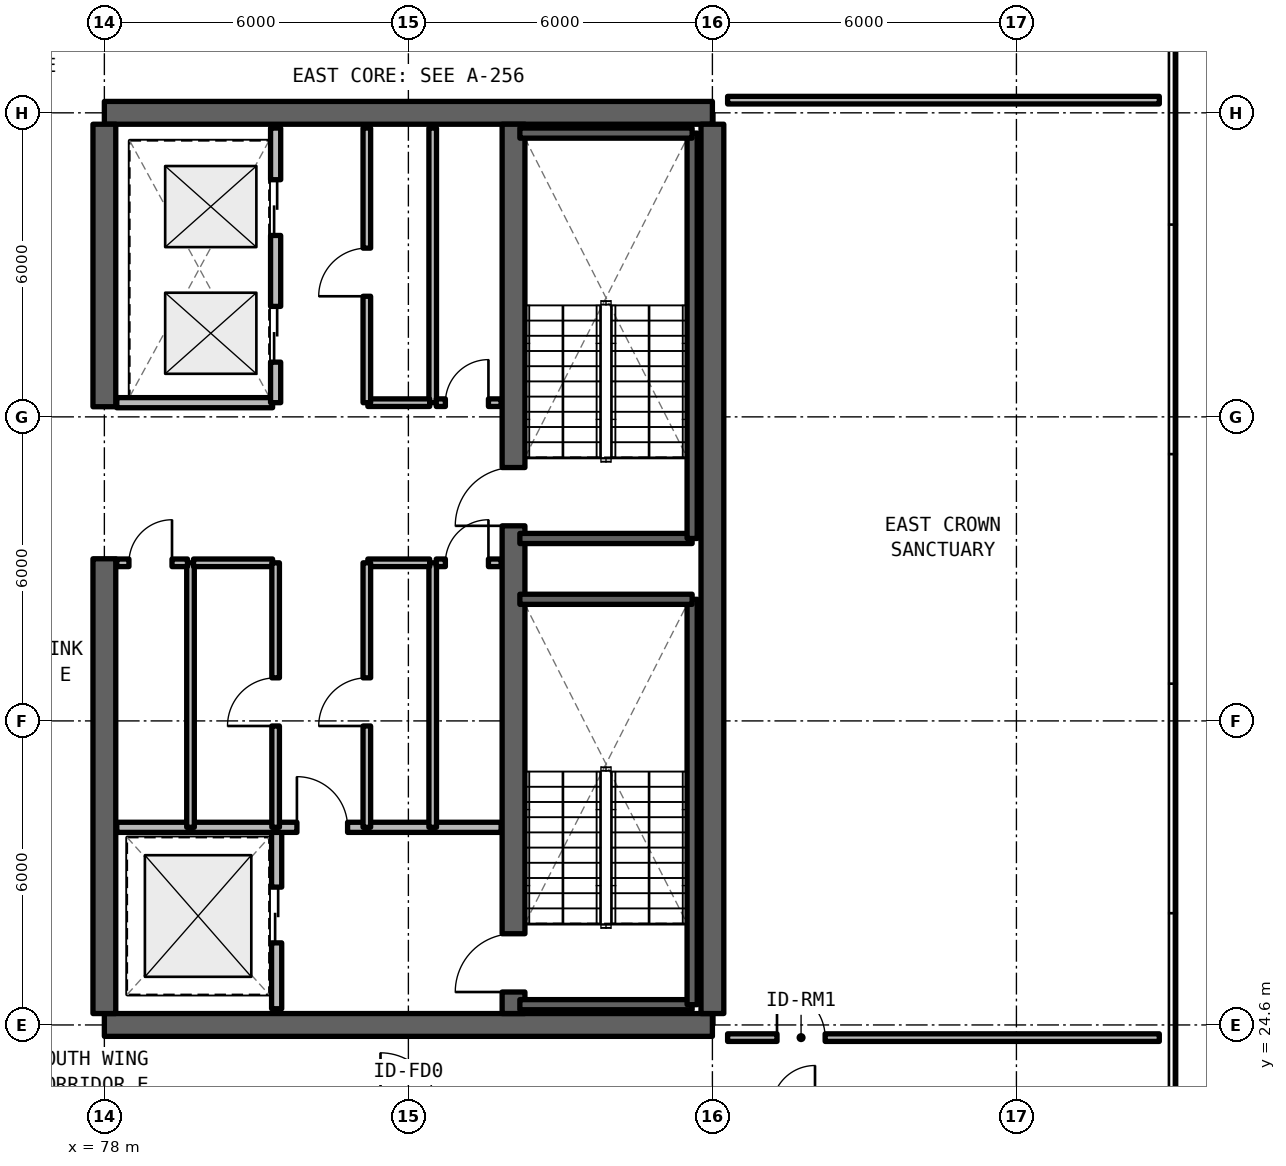
"""IFC4 building model, lengths in metres.
Left out: names, types, materials, properties, quantities, classifications, styles, units other than length and angle.
Written with IfcOpenShell. Run it as: python <this file> out.ifc"""

import sys

from ifc_helpers import new_model, si_unit, direction, frame, frame_2d, origin, place, context, subcontext, project, spatial, rectangle, extrude, element, fill, save


model = new_model("IFC4")
c1 = context("Model", 3, precision=1e-05, world=origin(), true_north=direction((0.0, 1.0)))
c2 = subcontext(c1, "Body", "Model", "MODEL_VIEW")
j1 = project(units=[si_unit("LENGTHUNIT", "METRE"), si_unit("PLANEANGLEUNIT", "RADIAN")], contexts=[c1])
p1 = place(None, origin())
s1 = spatial("IfcSite", under=j1, at=p1, CompositionType="ELEMENT")
p2 = place(p1, origin())
s2 = spatial("IfcBuilding", under=s1, at=p2, CompositionType="ELEMENT")
p3 = place(p2, frame((0.0, 0.0, 257.07)))
s3 = spatial("IfcBuildingStorey", under=s2, at=p3, CompositionType="ELEMENT", Elevation=257.07)
for number, where, z_axis, x_axis in (
    (1, (78.0, 24.6, 0.0), (0.0, 0.0, 1.0), (1.0, 0.0, 0.0)),
    (2, (90.0, 42.6, 0.0), (0.0, 0.0, 1.0), (-1.0, 0.0, 0.0)),
):
    element("IfcWall", number, at=place(p3, frame(where, z_axis=z_axis, x_axis=x_axis)), inside=s3, PredefinedType="SHEAR", context=c2, shape_type="SweptSolid", body=[
        extrude(rectangle(XDim=12.0, YDim=0.45, at=frame_2d((6.0, 0.0))), origin(), (0.0, 0.0, 1.0), 3.63),
    ])
p4 = place(p3, frame((90.0, 24.825, 0.0), z_axis=(0.0, 0.0, 1.0), x_axis=(0.0, 1.0, 0.0)))
e3 = element("IfcWall", 3, at=p4, inside=s3, PredefinedType="SHEAR", context=c2, shape_type="SweptSolid", body=[
    extrude(rectangle(XDim=17.55, YDim=0.45, at=frame_2d((8.775, 0.0))), origin(), (0.0, 0.0, 1.0), 3.63),
])
p5 = place(p3, frame((78.0, 24.825, 0.0), z_axis=(0.0, 0.0, 1.0), x_axis=(0.0, 1.0, 0.0)))
e4 = element("IfcWall", 4, at=p5, inside=s3, PredefinedType="SHEAR", context=c2, shape_type="SweptSolid", body=[
    extrude(rectangle(XDim=8.975, YDim=0.45, at=frame_2d((4.488, 0.0))), origin(), (0.0, 0.0, 1.0), 3.63),
])
p6 = place(p3, frame((78.0, 36.8, 0.0), z_axis=(0.0, 0.0, 1.0), x_axis=(0.0, 1.0, 0.0)))
e5 = element("IfcWall", 5, at=p6, inside=s3, PredefinedType="SHEAR", context=c2, shape_type="SweptSolid", body=[
    extrude(rectangle(XDim=5.575, YDim=0.45, at=frame_2d((2.788, 0.0))), origin(), (0.0, 0.0, 1.0), 3.63),
])
p7 = place(p3, frame((86.075, 24.825, 0.0), z_axis=(0.0, 0.0, 1.0), x_axis=(0.0, 1.0, 0.0)))
e6 = element("IfcWall", 6, at=p7, inside=s3, PredefinedType="SHEAR", context=c2, shape_type="SweptSolid", body=[
    extrude(rectangle(XDim=17.55, YDim=0.45, at=frame_2d((8.775, 0.0))), origin(), (0.0, 0.0, 1.0), 3.63),
])
p8 = place(p7, frame((0.425, 0.0, 0.0)))
e7 = element("IfcOpeningElement", 7, at=p8, cuts=e6, PredefinedType="OPENING", context=c2, shape_type="SweptSolid", body=[
    extrude(rectangle(XDim=1.15, YDim=2.15, at=frame_2d((0.575, 1.075))), frame((0.0, 0.235, 0.0), z_axis=(0.0, -1.0, 0.0), x_axis=(1.0, 0.0, 0.0)), (0.0, 0.0, 1.0), 0.47),
])
p9 = place(p7, frame((9.625, 0.0, 0.0)))
e8 = element("IfcOpeningElement", 8, at=p9, cuts=e6, PredefinedType="OPENING", context=c2, shape_type="SweptSolid", body=[
    extrude(rectangle(XDim=1.15, YDim=2.15, at=frame_2d((0.575, 1.075))), frame((0.0, 0.235, 0.0), z_axis=(0.0, -1.0, 0.0), x_axis=(1.0, 0.0, 0.0)), (0.0, 0.0, 1.0), 0.47),
])
p10 = place(p3, frame((81.4, 24.92, 0.0), z_axis=(0.0, 0.0, 1.0), x_axis=(0.0, 1.0, 0.0)))
e9 = element("IfcWall", 9, at=p10, inside=s3, PredefinedType="SOLIDWALL", context=c2, shape_type="SweptSolid", body=[
    extrude(rectangle(XDim=3.58, YDim=0.2, at=frame_2d((1.79, 0.0))), origin(), (0.0, 0.0, 1.0), 2.63),
])
p11 = place(p10, frame((1.3, 0.0, 0.0)))
e10 = element("IfcOpeningElement", 10, at=p11, cuts=e9, PredefinedType="OPENING", context=c2, shape_type="SweptSolid", body=[
    extrude(rectangle(XDim=1.1, YDim=2.2, at=frame_2d((0.55, 1.1))), frame((0.0, 0.11, 0.0), z_axis=(0.0, -1.0, 0.0), x_axis=(1.0, 0.0, 0.0)), (0.0, 0.0, 1.0), 0.22),
])
p12 = place(p3, frame((78.245, 28.5, 0.0), z_axis=(0.0, 0.0, 1.0), x_axis=(1.0, 0.0, 0.0)))
e11 = element("IfcWall", 11, at=p12, inside=s3, PredefinedType="SOLIDWALL", context=c2, shape_type="SweptSolid", body=[
    extrude(rectangle(XDim=7.585, YDim=0.2, at=frame_2d((3.792, 0.0))), origin(), (0.0, 0.0, 1.0), 2.63),
])
p13 = place(p12, frame((3.555, 0.0, 0.0)))
e12 = element("IfcOpeningElement", 12, at=p13, cuts=e11, PredefinedType="OPENING", context=c2, shape_type="SweptSolid", body=[
    extrude(rectangle(XDim=1.0, YDim=2.15, at=frame_2d((0.5, 1.075))), frame((0.0, 0.11, 0.0), z_axis=(0.0, -1.0, 0.0), x_axis=(1.0, 0.0, 0.0)), (0.0, 0.0, 1.0), 0.22),
])
p14 = place(p3, frame((84.48, 28.5, 0.0), z_axis=(0.0, 0.0, 1.0), x_axis=(0.0, 1.0, 0.0)))
e13 = element("IfcWall", 13, at=p14, inside=s3, PredefinedType="SOLIDWALL", context=c2, shape_type="SweptSolid", body=[
    extrude(rectangle(XDim=5.22, YDim=0.15, at=frame_2d((2.61, 0.0))), origin(), (0.0, 0.0, 1.0), 2.63),
])
p15 = place(p3, frame((84.55, 33.72, 0.0), z_axis=(0.0, 0.0, 1.0), x_axis=(1.0, 0.0, 0.0)))
e14 = element("IfcWall", 14, at=p15, inside=s3, PredefinedType="SOLIDWALL", context=c2, shape_type="SweptSolid", body=[
    extrude(rectangle(XDim=1.28, YDim=0.15, at=frame_2d((0.64, 0.0))), origin(), (0.0, 0.0, 1.0), 2.63),
])
p16 = place(p15, frame((0.18, 0.0, 0.0)))
e15 = element("IfcOpeningElement", 15, at=p16, cuts=e14, PredefinedType="OPENING", context=c2, shape_type="SweptSolid", body=[
    extrude(rectangle(XDim=0.85, YDim=2.1, at=frame_2d((0.425, 1.05))), frame((0.0, 0.085, 0.0), z_axis=(0.0, -1.0, 0.0), x_axis=(1.0, 0.0, 0.0)), (0.0, 0.0, 1.0), 0.17),
])
p17 = place(p3, frame((83.2, 33.72, 0.0), z_axis=(0.0, 0.0, 1.0), x_axis=(1.0, 0.0, 0.0)))
e16 = element("IfcWall", 16, at=p17, inside=s3, PredefinedType="SOLIDWALL", context=c2, shape_type="SweptSolid", body=[
    extrude(rectangle(XDim=1.22, YDim=0.15, at=frame_2d((0.61, 0.0))), origin(), (0.0, 0.0, 1.0), 2.63),
])
p18 = place(p3, frame((83.18, 28.5, 0.0), z_axis=(0.0, 0.0, 1.0), x_axis=(0.0, 1.0, 0.0)))
e17 = element("IfcWall", 17, at=p18, inside=s3, PredefinedType="SOLIDWALL", context=c2, shape_type="SweptSolid", body=[
    extrude(rectangle(XDim=5.22, YDim=0.15, at=frame_2d((2.61, 0.0))), origin(), (0.0, 0.0, 1.0), 2.63),
])
p19 = place(p18, frame((2.0, 0.0, 0.0)))
e18 = element("IfcOpeningElement", 18, at=p19, cuts=e17, PredefinedType="OPENING", context=c2, shape_type="SweptSolid", body=[
    extrude(rectangle(XDim=0.95, YDim=2.15, at=frame_2d((0.475, 1.075))), frame((0.0, 0.085, 0.0), z_axis=(0.0, -1.0, 0.0), x_axis=(1.0, 0.0, 0.0)), (0.0, 0.0, 1.0), 0.17),
])
p20 = place(p3, frame((79.7, 28.5, 0.0), z_axis=(0.0, 0.0, 1.0), x_axis=(0.0, 1.0, 0.0)))
e19 = element("IfcWall", 19, at=p20, inside=s3, PredefinedType="SOLIDWALL", context=c2, shape_type="SweptSolid", body=[
    extrude(rectangle(XDim=5.22, YDim=0.15, at=frame_2d((2.61, 0.0))), origin(), (0.0, 0.0, 1.0), 2.63),
])
p21 = place(p3, frame((79.76, 33.72, 0.0), z_axis=(0.0, 0.0, 1.0), x_axis=(1.0, 0.0, 0.0)))
e20 = element("IfcWall", 20, at=p21, inside=s3, PredefinedType="SOLIDWALL", context=c2, shape_type="SweptSolid", body=[
    extrude(rectangle(XDim=1.56, YDim=0.15, at=frame_2d((0.78, 0.0))), origin(), (0.0, 0.0, 1.0), 2.63),
])
p22 = place(p3, frame((78.245, 33.72, 0.0), z_axis=(0.0, 0.0, 1.0), x_axis=(1.0, 0.0, 0.0)))
e21 = element("IfcWall", 21, at=p22, inside=s3, PredefinedType="SOLIDWALL", context=c2, shape_type="SweptSolid", body=[
    extrude(rectangle(XDim=1.395, YDim=0.15, at=frame_2d((0.697, 0.0))), origin(), (0.0, 0.0, 1.0), 2.63),
])
p23 = place(p22, frame((0.24, 0.0, 0.0)))
e22 = element("IfcOpeningElement", 22, at=p23, cuts=e21, PredefinedType="OPENING", context=c2, shape_type="SweptSolid", body=[
    extrude(rectangle(XDim=0.85, YDim=2.1, at=frame_2d((0.425, 1.05))), frame((0.0, 0.085, 0.0), z_axis=(0.0, -1.0, 0.0), x_axis=(1.0, 0.0, 0.0)), (0.0, 0.0, 1.0), 0.17),
])
p24 = place(p3, frame((81.38, 28.5, 0.0), z_axis=(0.0, 0.0, 1.0), x_axis=(0.0, 1.0, 0.0)))
e23 = element("IfcWall", 23, at=p24, inside=s3, PredefinedType="SOLIDWALL", context=c2, shape_type="SweptSolid", body=[
    extrude(rectangle(XDim=5.22, YDim=0.15, at=frame_2d((2.61, 0.0))), origin(), (0.0, 0.0, 1.0), 2.63),
])
p25 = place(p24, frame((2.0, 0.0, 0.0)))
e24 = element("IfcOpeningElement", 24, at=p25, cuts=e23, PredefinedType="OPENING", context=c2, shape_type="SweptSolid", body=[
    extrude(rectangle(XDim=0.95, YDim=2.15, at=frame_2d((0.475, 1.075))), frame((0.0, 0.085, 0.0), z_axis=(0.0, -1.0, 0.0), x_axis=(1.0, 0.0, 0.0)), (0.0, 0.0, 1.0), 0.17),
])
p26 = place(p3, frame((84.48, 36.88, 0.0), z_axis=(0.0, 0.0, 1.0), x_axis=(0.0, 1.0, 0.0)))
e25 = element("IfcWall", 25, at=p26, inside=s3, PredefinedType="SOLIDWALL", context=c2, shape_type="SweptSolid", body=[
    extrude(rectangle(XDim=5.42, YDim=0.15, at=frame_2d((2.71, 0.0))), origin(), (0.0, 0.0, 1.0), 2.63),
])
p27 = place(p3, frame((84.55, 36.88, 0.0), z_axis=(0.0, 0.0, 1.0), x_axis=(1.0, 0.0, 0.0)))
e26 = element("IfcWall", 26, at=p27, inside=s3, PredefinedType="SOLIDWALL", context=c2, shape_type="SweptSolid", body=[
    extrude(rectangle(XDim=1.28, YDim=0.15, at=frame_2d((0.64, 0.0))), origin(), (0.0, 0.0, 1.0), 2.63),
])
p28 = place(p27, frame((0.18, 0.0, 0.0)))
e27 = element("IfcOpeningElement", 27, at=p28, cuts=e26, PredefinedType="OPENING", context=c2, shape_type="SweptSolid", body=[
    extrude(rectangle(XDim=0.85, YDim=2.1, at=frame_2d((0.425, 1.05))), frame((0.0, 0.085, 0.0), z_axis=(0.0, -1.0, 0.0), x_axis=(1.0, 0.0, 0.0)), (0.0, 0.0, 1.0), 0.17),
])
p29 = place(p3, frame((83.2, 36.88, 0.0), z_axis=(0.0, 0.0, 1.0), x_axis=(1.0, 0.0, 0.0)))
e28 = element("IfcWall", 28, at=p29, inside=s3, PredefinedType="SOLIDWALL", context=c2, shape_type="SweptSolid", body=[
    extrude(rectangle(XDim=1.22, YDim=0.15, at=frame_2d((0.61, 0.0))), origin(), (0.0, 0.0, 1.0), 2.63),
])
p30 = place(p3, frame((83.18, 36.88, 0.0), z_axis=(0.0, 0.0, 1.0), x_axis=(0.0, 1.0, 0.0)))
e29 = element("IfcWall", 29, at=p30, inside=s3, PredefinedType="SOLIDWALL", context=c2, shape_type="SweptSolid", body=[
    extrude(rectangle(XDim=5.42, YDim=0.15, at=frame_2d((2.71, 0.0))), origin(), (0.0, 0.0, 1.0), 2.63),
])
p31 = place(p30, frame((2.1, 0.0, 0.0)))
e30 = element("IfcOpeningElement", 30, at=p31, cuts=e29, PredefinedType="OPENING", context=c2, shape_type="SweptSolid", body=[
    extrude(rectangle(XDim=0.95, YDim=2.15, at=frame_2d((0.475, 1.075))), frame((0.0, 0.085, 0.0), z_axis=(0.0, -1.0, 0.0), x_axis=(1.0, 0.0, 0.0)), (0.0, 0.0, 1.0), 0.17),
])
p32 = place(p3, frame((78.245, 36.88, 0.0), z_axis=(0.0, 0.0, 1.0), x_axis=(1.0, 0.0, 0.0)))
e31 = element("IfcWall", 31, at=p32, inside=s3, PredefinedType="SOLIDWALL", context=c2, shape_type="SweptSolid", body=[
    extrude(rectangle(XDim=3.075, YDim=0.2, at=frame_2d((1.538, 0.0))), origin(), (0.0, 0.0, 1.0), 2.63),
])
p33 = place(p3, frame((81.38, 36.88, 0.0), z_axis=(0.0, 0.0, 1.0), x_axis=(0.0, 1.0, 0.0)))
e32 = element("IfcWall", 32, at=p33, inside=s3, PredefinedType="SOLIDWALL", context=c2, shape_type="SweptSolid", body=[
    extrude(rectangle(XDim=5.42, YDim=0.2, at=frame_2d((2.71, 0.0))), origin(), (0.0, 0.0, 1.0), 2.63),
])
p34 = place(p33, frame((0.8, 0.0, 0.0)))
e33 = element("IfcOpeningElement", 33, at=p34, cuts=e32, PredefinedType="OPENING", context=c2, shape_type="SweptSolid", body=[
    extrude(rectangle(XDim=1.1, YDim=2.2, at=frame_2d((0.55, 1.1))), frame((0.0, 0.11, 0.0), z_axis=(0.0, -1.0, 0.0), x_axis=(1.0, 0.0, 0.0)), (0.0, 0.0, 1.0), 0.22),
])
p35 = place(p33, frame((3.3, 0.0, 0.0)))
e34 = element("IfcOpeningElement", 34, at=p35, cuts=e32, PredefinedType="OPENING", context=c2, shape_type="SweptSolid", body=[
    extrude(rectangle(XDim=1.1, YDim=2.2, at=frame_2d((0.55, 1.1))), frame((0.0, 0.11, 0.0), z_axis=(0.0, -1.0, 0.0), x_axis=(1.0, 0.0, 0.0)), (0.0, 0.0, 1.0), 0.22),
])
p36 = place(p3, frame((90.3, 24.35, 0.0), z_axis=(0.0, 0.0, 1.0), x_axis=(1.0, 0.0, 0.0)))
e35 = element("IfcWall", 35, at=p36, inside=s3, PredefinedType="SOLIDWALL", context=c2, shape_type="SweptSolid", body=[
    extrude(rectangle(XDim=8.52, YDim=0.15, at=frame_2d((4.26, 0.0))), origin(), (0.0, 0.0, 1.0), 2.63),
])
p37 = place(p36, frame((0.975, 0.0, 0.0)))
e36 = element("IfcOpeningElement", 36, at=p37, cuts=e35, PredefinedType="OPENING", context=c2, shape_type="SweptSolid", body=[
    extrude(rectangle(XDim=0.95, YDim=2.15, at=frame_2d((0.475, 1.075))), frame((0.0, 0.085, 0.0), z_axis=(0.0, -1.0, 0.0), x_axis=(1.0, 0.0, 0.0)), (0.0, 0.0, 1.0), 0.17),
])
p38 = place(p3, frame((90.3, 42.85, 0.0), z_axis=(0.0, 0.0, 1.0), x_axis=(1.0, 0.0, 0.0)))
e37 = element("IfcWall", 37, at=p38, inside=s3, PredefinedType="SOLIDWALL", context=c2, shape_type="SweptSolid", body=[
    extrude(rectangle(XDim=8.52, YDim=0.15, at=frame_2d((4.26, 0.0))), origin(), (0.0, 0.0, 1.0), 2.63),
])
p39 = place(p3, frame((86.2, 25.0, 0.0), z_axis=(0.0, 0.0, 1.0), x_axis=(1.0, 0.0, 0.0)))
e38 = element("IfcWall", 38, at=p39, inside=s3, PredefinedType="SOLIDWALL", context=c2, shape_type="SweptSolid", body=[
    extrude(rectangle(XDim=3.4, YDim=0.2, at=frame_2d((1.7, 0.0))), origin(), (0.0, 0.0, 1.0), 3.63),
])
p40 = place(p3, frame((89.6, 25.0, 0.0), z_axis=(0.0, 0.0, 1.0), x_axis=(0.0, 1.0, 0.0)))
e39 = element("IfcWall", 39, at=p40, inside=s3, PredefinedType="SOLIDWALL", context=c2, shape_type="SweptSolid", body=[
    extrude(rectangle(XDim=8.0, YDim=0.2, at=frame_2d((4.0, 0.0))), origin(), (0.0, 0.0, 1.0), 3.63),
])
for number, where, z_axis, x_axis in (
    (40, (89.6, 33.0, 0.0), (0.0, 0.0, 1.0), (-1.0, 0.0, 0.0)),
    (41, (86.2, 34.2, 0.0), (0.0, 0.0, 1.0), (1.0, 0.0, 0.0)),
):
    element("IfcWall", number, at=place(p3, frame(where, z_axis=z_axis, x_axis=x_axis)), inside=s3, PredefinedType="SOLIDWALL", context=c2, shape_type="SweptSolid", body=[
        extrude(rectangle(XDim=3.4, YDim=0.2, at=frame_2d((1.7, 0.0))), origin(), (0.0, 0.0, 1.0), 3.63),
    ])
p41 = place(p3, frame((89.6, 34.2, 0.0), z_axis=(0.0, 0.0, 1.0), x_axis=(0.0, 1.0, 0.0)))
e42 = element("IfcWall", 42, at=p41, inside=s3, PredefinedType="SOLIDWALL", context=c2, shape_type="SweptSolid", body=[
    extrude(rectangle(XDim=8.0, YDim=0.2, at=frame_2d((4.0, 0.0))), origin(), (0.0, 0.0, 1.0), 3.63),
])
p42 = place(p3, frame((89.6, 42.2, 0.0), z_axis=(0.0, 0.0, 1.0), x_axis=(-1.0, 0.0, 0.0)))
e43 = element("IfcWall", 43, at=p42, inside=s3, PredefinedType="SOLIDWALL", context=c2, shape_type="SweptSolid", body=[
    extrude(rectangle(XDim=3.4, YDim=0.2, at=frame_2d((1.7, 0.0))), origin(), (0.0, 0.0, 1.0), 3.63),
])
p43 = place(p11, origin())
e44 = element("IfcDoor", 44, at=p43, inside=s3, OperationType="SLIDING_TO_LEFT", PredefinedType="DOOR", context=c2, shape_type="SweptSolid", body=[
    extrude(rectangle(XDim=1.1, YDim=2.2, at=frame_2d((0.55, 1.1))), frame((0.0, 0.025, 0.0), z_axis=(0.0, -1.0, 0.0), x_axis=(1.0, 0.0, 0.0)), (0.0, 0.0, 1.0), 0.05),
])
fill(e10, e44)
p44 = place(p13, origin())
e45 = element("IfcDoor", 45, at=p44, inside=s3, OperationType="SINGLE_SWING_LEFT", PredefinedType="DOOR", context=c2, shape_type="SweptSolid", body=[
    extrude(rectangle(XDim=1.0, YDim=2.15, at=frame_2d((0.5, 1.075))), frame((0.0, 0.025, 0.0), z_axis=(0.0, -1.0, 0.0), x_axis=(1.0, 0.0, 0.0)), (0.0, 0.0, 1.0), 0.05),
])
fill(e12, e45)
p45 = place(p16, origin())
e46 = element("IfcDoor", 46, at=p45, inside=s3, OperationType="SINGLE_SWING_RIGHT", PredefinedType="DOOR", context=c2, shape_type="SweptSolid", body=[
    extrude(rectangle(XDim=0.85, YDim=2.1, at=frame_2d((0.425, 1.05))), frame((0.0, 0.025, 0.0), z_axis=(0.0, -1.0, 0.0), x_axis=(1.0, 0.0, 0.0)), (0.0, 0.0, 1.0), 0.05),
])
fill(e15, e46)
p46 = place(p19, origin())
e47 = element("IfcDoor", 47, at=p46, inside=s3, OperationType="SINGLE_SWING_LEFT", PredefinedType="DOOR", context=c2, shape_type="SweptSolid", body=[
    extrude(rectangle(XDim=0.95, YDim=2.15, at=frame_2d((0.475, 1.075))), frame((0.0, 0.025, 0.0), z_axis=(0.0, -1.0, 0.0), x_axis=(1.0, 0.0, 0.0)), (0.0, 0.0, 1.0), 0.05),
])
fill(e18, e47)
p47 = place(p23, origin())
e48 = element("IfcDoor", 48, at=p47, inside=s3, OperationType="SINGLE_SWING_RIGHT", PredefinedType="DOOR", context=c2, shape_type="SweptSolid", body=[
    extrude(rectangle(XDim=0.85, YDim=2.1, at=frame_2d((0.425, 1.05))), frame((0.0, 0.025, 0.0), z_axis=(0.0, -1.0, 0.0), x_axis=(1.0, 0.0, 0.0)), (0.0, 0.0, 1.0), 0.05),
])
fill(e22, e48)
p48 = place(p25, origin())
e49 = element("IfcDoor", 49, at=p48, inside=s3, OperationType="SINGLE_SWING_LEFT", PredefinedType="DOOR", context=c2, shape_type="SweptSolid", body=[
    extrude(rectangle(XDim=0.95, YDim=2.15, at=frame_2d((0.475, 1.075))), frame((0.0, 0.025, 0.0), z_axis=(0.0, -1.0, 0.0), x_axis=(1.0, 0.0, 0.0)), (0.0, 0.0, 1.0), 0.05),
])
fill(e24, e49)
p49 = place(p28, origin())
e50 = element("IfcDoor", 50, at=p49, inside=s3, OperationType="SINGLE_SWING_RIGHT", PredefinedType="DOOR", context=c2, shape_type="SweptSolid", body=[
    extrude(rectangle(XDim=0.85, YDim=2.1, at=frame_2d((0.425, 1.05))), frame((0.0, 0.025, 0.0), z_axis=(0.0, -1.0, 0.0), x_axis=(1.0, 0.0, 0.0)), (0.0, 0.0, 1.0), 0.05),
])
fill(e27, e50)
p50 = place(p31, origin())
e51 = element("IfcDoor", 51, at=p50, inside=s3, OperationType="SINGLE_SWING_LEFT", PredefinedType="DOOR", context=c2, shape_type="SweptSolid", body=[
    extrude(rectangle(XDim=0.95, YDim=2.15, at=frame_2d((0.475, 1.075))), frame((0.0, 0.025, 0.0), z_axis=(0.0, -1.0, 0.0), x_axis=(1.0, 0.0, 0.0)), (0.0, 0.0, 1.0), 0.05),
])
fill(e30, e51)
p51 = place(p34, origin())
e52 = element("IfcDoor", 52, at=p51, inside=s3, OperationType="SLIDING_TO_LEFT", PredefinedType="DOOR", context=c2, shape_type="SweptSolid", body=[
    extrude(rectangle(XDim=1.1, YDim=2.2, at=frame_2d((0.55, 1.1))), frame((0.0, 0.025, 0.0), z_axis=(0.0, -1.0, 0.0), x_axis=(1.0, 0.0, 0.0)), (0.0, 0.0, 1.0), 0.05),
])
fill(e33, e52)
p52 = place(p35, origin())
e53 = element("IfcDoor", 53, at=p52, inside=s3, OperationType="SLIDING_TO_RIGHT", PredefinedType="DOOR", context=c2, shape_type="SweptSolid", body=[
    extrude(rectangle(XDim=1.1, YDim=2.2, at=frame_2d((0.55, 1.1))), frame((0.0, 0.025, 0.0), z_axis=(0.0, -1.0, 0.0), x_axis=(1.0, 0.0, 0.0)), (0.0, 0.0, 1.0), 0.05),
])
fill(e34, e53)
p53 = place(p37, origin())
e54 = element("IfcDoor", 54, at=p53, inside=s3, OperationType="SINGLE_SWING_LEFT", PredefinedType="DOOR", context=c2, shape_type="SweptSolid", body=[
    extrude(rectangle(XDim=0.95, YDim=2.15, at=frame_2d((0.475, 1.075))), frame((0.0, 0.025, 0.0), z_axis=(0.0, -1.0, 0.0), x_axis=(1.0, 0.0, 0.0)), (0.0, 0.0, 1.0), 0.05),
])
fill(e36, e54)
p54 = place(p8, origin())
e55 = element("IfcDoor", 55, at=p54, inside=s3, OperationType="SINGLE_SWING_LEFT", PredefinedType="DOOR", context=c2, shape_type="SweptSolid", body=[
    extrude(rectangle(XDim=1.15, YDim=2.15, at=frame_2d((0.575, 1.075))), frame((0.0, 0.025, 0.0), z_axis=(0.0, -1.0, 0.0), x_axis=(1.0, 0.0, 0.0)), (0.0, 0.0, 1.0), 0.05),
])
fill(e7, e55)
p55 = place(p9, origin())
e56 = element("IfcDoor", 56, at=p55, inside=s3, OperationType="SINGLE_SWING_RIGHT", PredefinedType="DOOR", context=c2, shape_type="SweptSolid", body=[
    extrude(rectangle(XDim=1.15, YDim=2.15, at=frame_2d((0.575, 1.075))), frame((0.0, 0.025, 0.0), z_axis=(0.0, -1.0, 0.0), x_axis=(1.0, 0.0, 0.0)), (0.0, 0.0, 1.0), 0.05),
])
fill(e8, e56)
save(model, sys.argv[1])
